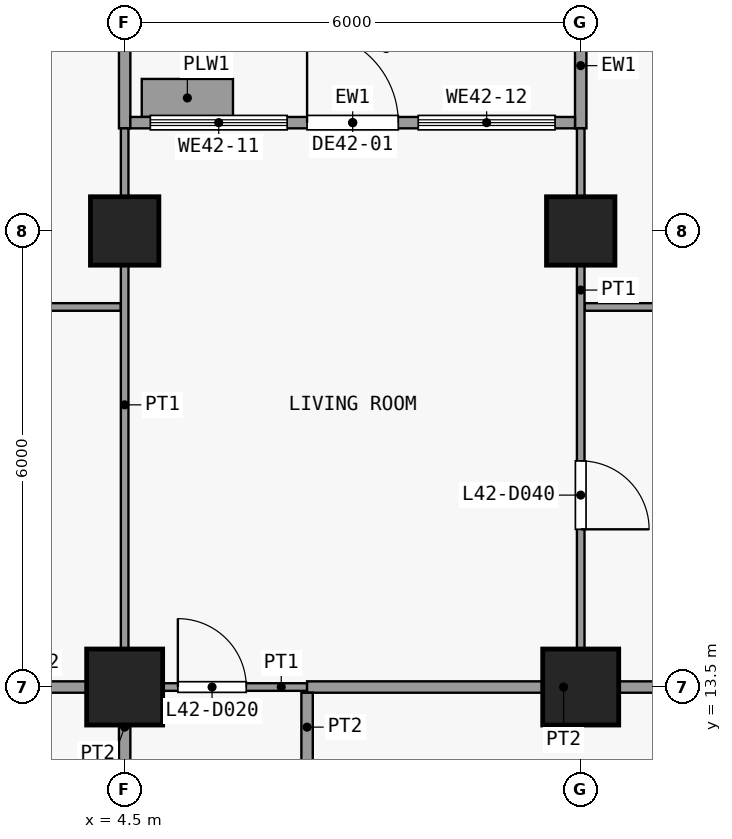
"""IFC4 building model, lengths in metres.
Left out: names, types, materials, properties, quantities, classifications, styles, units other than length and angle.
Written with IfcOpenShell. Run it as: python <this file> out.ifc"""

import sys

from ifc_helpers import new_model, si_unit, direction, frame, frame_2d, origin, origin_2d, place, context, subcontext, project, spatial, rectangle, extrude, element, fill, save


model = new_model("IFC4")
c1 = context("Model", 3, precision=1e-05, world=origin(), true_north=direction((0.0, 1.0)))
c2 = subcontext(c1, "Body", "Model", "MODEL_VIEW")
j1 = project(units=[si_unit("LENGTHUNIT", "METRE"), si_unit("PLANEANGLEUNIT", "RADIAN")], contexts=[c1])
p1 = place(None, origin())
s1 = spatial("IfcSite", under=j1, at=p1, CompositionType="ELEMENT")
p2 = place(p1, origin())
s2 = spatial("IfcBuilding", under=s1, at=p2, CompositionType="ELEMENT")
p3 = place(p2, frame((0.0, 0.0, 170.9)))
s3 = spatial("IfcBuildingStorey", under=s2, at=p3, CompositionType="ELEMENT", Elevation=170.9)
p4 = place(p3, frame((4.5, 13.5, 0.0), z_axis=(0.0, 0.0, 1.0), x_axis=(1.0, 0.0, 0.0)))
e1 = element("IfcColumn", 1, at=p4, inside=s3, PredefinedType="COLUMN", context=c2, shape_type="SweptSolid", body=[
    extrude(rectangle(XDim=1.0, YDim=1.0, at=origin_2d()), origin(), (0.0, 0.0, 1.0), 3.6),
])
p5 = place(p3, frame((4.5, 19.5, 0.0), z_axis=(0.0, 0.0, 1.0), x_axis=(1.0, 0.0, 0.0)))
e2 = element("IfcColumn", 2, at=p5, inside=s3, PredefinedType="COLUMN", context=c2, shape_type="SweptSolid", body=[
    extrude(rectangle(XDim=0.9, YDim=0.9, at=origin_2d()), origin(), (0.0, 0.0, 1.0), 3.6),
])
p6 = place(p3, frame((10.5, 13.5, 0.0), z_axis=(0.0, 0.0, 1.0), x_axis=(1.0, 0.0, 0.0)))
e3 = element("IfcColumn", 3, at=p6, inside=s3, PredefinedType="COLUMN", context=c2, shape_type="SweptSolid", body=[
    extrude(rectangle(XDim=1.0, YDim=1.0, at=origin_2d()), origin(), (0.0, 0.0, 1.0), 3.6),
])
p7 = place(p3, frame((10.5, 19.5, 0.0), z_axis=(0.0, 0.0, 1.0), x_axis=(1.0, 0.0, 0.0)))
e4 = element("IfcColumn", 4, at=p7, inside=s3, PredefinedType="COLUMN", context=c2, shape_type="SweptSolid", body=[
    extrude(rectangle(XDim=0.9, YDim=0.9, at=origin_2d()), origin(), (0.0, 0.0, 1.0), 3.6),
])
p8 = place(p3, frame((4.5, 20.85, 0.0), z_axis=(0.0, 0.0, 1.0), x_axis=(0.0, 1.0, 0.0)))
e5 = element("IfcWall", 5, at=p8, inside=s3, PredefinedType="SOLIDWALL", context=c2, shape_type="SweptSolid", body=[
    extrude(rectangle(XDim=2.55, YDim=0.15, at=frame_2d((1.275, 0.0))), origin(), (0.0, 0.0, 1.0), 3.3),
])
p9 = place(p3, frame((10.5, 20.85, 0.0), z_axis=(0.0, 0.0, 1.0), x_axis=(0.0, 1.0, 0.0)))
e6 = element("IfcWall", 6, at=p9, inside=s3, PredefinedType="SOLIDWALL", context=c2, shape_type="SweptSolid", body=[
    extrude(rectangle(XDim=1.65, YDim=0.15, at=frame_2d((0.825, 0.0))), origin(), (0.0, 0.0, 1.0), 3.3),
])
p10 = place(p3, frame((4.575, 20.925, 0.0), z_axis=(0.0, 0.0, 1.0), x_axis=(1.0, 0.0, 0.0)))
e7 = element("IfcWall", 7, at=p10, inside=s3, PredefinedType="SOLIDWALL", context=c2, shape_type="SweptSolid", body=[
    extrude(rectangle(XDim=5.85, YDim=0.15, at=frame_2d((2.925, 0.0))), origin(), (0.0, 0.0, 1.0), 3.3),
])
p11 = place(p10, frame((2.325, 0.0, 0.0)))
e8 = element("IfcOpeningElement", 8, at=p11, cuts=e7, PredefinedType="OPENING", context=c2, shape_type="SweptSolid", body=[
    extrude(rectangle(XDim=1.2, YDim=2.4, at=frame_2d((0.6, 1.2))), frame((0.0, 0.085, 0.0), z_axis=(0.0, -1.0, 0.0), x_axis=(1.0, 0.0, 0.0)), (0.0, 0.0, 1.0), 0.17),
])
p12 = place(p10, frame((0.262, 0.0, 0.9)))
e9 = element("IfcOpeningElement", 9, at=p12, cuts=e7, PredefinedType="OPENING", context=c2, shape_type="SweptSolid", body=[
    extrude(rectangle(XDim=1.8, YDim=2.1, at=frame_2d((0.9, 1.05))), frame((0.0, 0.085, 0.0), z_axis=(0.0, -1.0, 0.0), x_axis=(1.0, 0.0, 0.0)), (0.0, 0.0, 1.0), 0.17),
])
p13 = place(p10, frame((3.788, 0.0, 0.9)))
e10 = element("IfcOpeningElement", 10, at=p13, cuts=e7, PredefinedType="OPENING", context=c2, shape_type="SweptSolid", body=[
    extrude(rectangle(XDim=1.8, YDim=2.1, at=frame_2d((0.9, 1.05))), frame((0.0, 0.085, 0.0), z_axis=(0.0, -1.0, 0.0), x_axis=(1.0, 0.0, 0.0)), (0.0, 0.0, 1.0), 0.17),
])
p14 = place(p3, frame((4.725, 21.25, 0.0), z_axis=(0.0, 0.0, 1.0), x_axis=(1.0, 0.0, 0.0)))
e11 = element("IfcWall", 11, at=p14, inside=s3, PredefinedType="USERDEFINED", context=c2, shape_type="SweptSolid", body=[
    extrude(rectangle(XDim=1.2, YDim=0.5, at=frame_2d((0.6, 0.0))), origin(), (0.0, 0.0, 1.0), 0.9),
])
p15 = place(p3, frame((4.5, 13.5, 0.0), z_axis=(0.0, 0.0, 1.0), x_axis=(1.0, 0.0, 0.0)))
e12 = element("IfcWall", 12, at=p15, inside=s3, PredefinedType="PARTITIONING", context=c2, shape_type="SweptSolid", body=[
    extrude(rectangle(XDim=2.4, YDim=0.1, at=frame_2d((1.2, 0.0))), origin(), (0.0, 0.0, 1.0), 3.3),
])
p16 = place(p15, frame((0.7, 0.0, 0.0)))
e13 = element("IfcOpeningElement", 13, at=p16, cuts=e12, PredefinedType="OPENING", context=c2, shape_type="SweptSolid", body=[
    extrude(rectangle(XDim=0.9, YDim=2.1, at=frame_2d((0.45, 1.05))), frame((0.0, 0.06, 0.0), z_axis=(0.0, -1.0, 0.0), x_axis=(1.0, 0.0, 0.0)), (0.0, 0.0, 1.0), 0.12),
])
p17 = place(p3, frame((-1.0, 13.5, 0.0), z_axis=(0.0, 0.0, 1.0), x_axis=(1.0, 0.0, 0.0)))
e14 = element("IfcWall", 14, at=p17, inside=s3, PredefinedType="PARTITIONING", context=c2, shape_type="SweptSolid", body=[
    extrude(rectangle(XDim=5.5, YDim=0.15, at=frame_2d((2.75, 0.0))), origin(), (0.0, 0.0, 1.0), 3.3),
])
p18 = place(p17, frame((2.3, 0.0, 0.0)))
e15 = element("IfcOpeningElement", 15, at=p18, cuts=e14, PredefinedType="OPENING", context=c2, shape_type="SweptSolid", body=[
    extrude(rectangle(XDim=0.9, YDim=2.1, at=frame_2d((0.45, 1.05))), frame((0.0, 0.085, 0.0), z_axis=(0.0, -1.0, 0.0), x_axis=(1.0, 0.0, 0.0)), (0.0, 0.0, 1.0), 0.17),
])
p19 = place(p3, frame((6.9, 13.5, 0.0), z_axis=(0.0, 0.0, 1.0), x_axis=(1.0, 0.0, 0.0)))
e16 = element("IfcWall", 16, at=p19, inside=s3, PredefinedType="PARTITIONING", context=c2, shape_type="SweptSolid", body=[
    extrude(rectangle(XDim=6.75, YDim=0.15, at=frame_2d((3.375, 0.0))), origin(), (0.0, 0.0, 1.0), 3.3),
])
p20 = place(p3, frame((-4.4, 18.5, 0.0), z_axis=(0.0, 0.0, 1.0), x_axis=(1.0, 0.0, 0.0)))
e17 = element("IfcWall", 17, at=p20, inside=s3, PredefinedType="PARTITIONING", context=c2, shape_type="SweptSolid", body=[
    extrude(rectangle(XDim=8.85, YDim=0.1, at=frame_2d((4.425, 0.0))), origin(), (0.0, 0.0, 1.0), 3.3),
])
p21 = place(p20, frame((4.0, 0.0, 0.0)))
e18 = element("IfcOpeningElement", 18, at=p21, cuts=e17, PredefinedType="OPENING", context=c2, shape_type="SweptSolid", body=[
    extrude(rectangle(XDim=0.9, YDim=2.1, at=frame_2d((0.45, 1.05))), frame((0.0, 0.06, 0.0), z_axis=(0.0, -1.0, 0.0), x_axis=(1.0, 0.0, 0.0)), (0.0, 0.0, 1.0), 0.12),
])
p22 = place(p3, frame((10.55, 18.5, 0.0), z_axis=(0.0, 0.0, 1.0), x_axis=(1.0, 0.0, 0.0)))
e19 = element("IfcWall", 19, at=p22, inside=s3, PredefinedType="PARTITIONING", context=c2, shape_type="SweptSolid", body=[
    extrude(rectangle(XDim=4.8, YDim=0.1, at=frame_2d((2.4, 0.0))), origin(), (0.0, 0.0, 1.0), 3.3),
])
p23 = place(p22, frame((1.9, 0.0, 0.0)))
e20 = element("IfcOpeningElement", 20, at=p23, cuts=e19, PredefinedType="OPENING", context=c2, shape_type="SweptSolid", body=[
    extrude(rectangle(XDim=0.9, YDim=2.1, at=frame_2d((0.45, 1.05))), frame((0.0, 0.06, 0.0), z_axis=(0.0, -1.0, 0.0), x_axis=(1.0, 0.0, 0.0)), (0.0, 0.0, 1.0), 0.12),
])
p24 = place(p3, frame((4.5, 13.575, 0.0), z_axis=(0.0, 0.0, 1.0), x_axis=(0.0, 1.0, 0.0)))
e21 = element("IfcWall", 21, at=p24, inside=s3, PredefinedType="PARTITIONING", context=c2, shape_type="SweptSolid", body=[
    extrude(rectangle(XDim=7.275, YDim=0.1, at=frame_2d((3.638, 0.0))), origin(), (0.0, 0.0, 1.0), 3.3),
])
p25 = place(p3, frame((4.5, 10.6, 0.0), z_axis=(0.0, 0.0, 1.0), x_axis=(0.0, 1.0, 0.0)))
e22 = element("IfcWall", 22, at=p25, inside=s3, PredefinedType="PARTITIONING", context=c2, shape_type="SweptSolid", body=[
    extrude(rectangle(XDim=2.825, YDim=0.15, at=frame_2d((1.413, 0.0))), origin(), (0.0, 0.0, 1.0), 3.3),
])
p26 = place(p25, frame((0.9, 0.0, 0.0)))
e23 = element("IfcOpeningElement", 23, at=p26, cuts=e22, PredefinedType="OPENING", context=c2, shape_type="SweptSolid", body=[
    extrude(rectangle(XDim=0.9, YDim=2.1, at=frame_2d((0.45, 1.05))), frame((0.0, 0.085, 0.0), z_axis=(0.0, -1.0, 0.0), x_axis=(1.0, 0.0, 0.0)), (0.0, 0.0, 1.0), 0.17),
])
p27 = place(p3, frame((6.9, 10.6, 0.0), z_axis=(0.0, 0.0, 1.0), x_axis=(0.0, 1.0, 0.0)))
e24 = element("IfcWall", 24, at=p27, inside=s3, PredefinedType="PARTITIONING", context=c2, shape_type="SweptSolid", body=[
    extrude(rectangle(XDim=2.825, YDim=0.15, at=frame_2d((1.413, 0.0))), origin(), (0.0, 0.0, 1.0), 3.3),
])
p28 = place(p27, frame((0.9, 0.0, 0.0)))
e25 = element("IfcOpeningElement", 25, at=p28, cuts=e24, PredefinedType="OPENING", context=c2, shape_type="SweptSolid", body=[
    extrude(rectangle(XDim=0.9, YDim=2.1, at=frame_2d((0.45, 1.05))), frame((0.0, 0.085, 0.0), z_axis=(0.0, -1.0, 0.0), x_axis=(1.0, 0.0, 0.0)), (0.0, 0.0, 1.0), 0.17),
])
p29 = place(p3, frame((10.5, 13.575, 0.0), z_axis=(0.0, 0.0, 1.0), x_axis=(0.0, 1.0, 0.0)))
e26 = element("IfcWall", 26, at=p29, inside=s3, PredefinedType="PARTITIONING", context=c2, shape_type="SweptSolid", body=[
    extrude(rectangle(XDim=7.275, YDim=0.1, at=frame_2d((3.638, 0.0))), origin(), (0.0, 0.0, 1.0), 3.3),
])
p30 = place(p29, frame((2.0, 0.0, 0.0)))
e27 = element("IfcOpeningElement", 27, at=p30, cuts=e26, PredefinedType="OPENING", context=c2, shape_type="SweptSolid", body=[
    extrude(rectangle(XDim=0.9, YDim=2.1, at=frame_2d((0.45, 1.05))), frame((0.0, 0.06, 0.0), z_axis=(0.0, -1.0, 0.0), x_axis=(1.0, 0.0, 0.0)), (0.0, 0.0, 1.0), 0.12),
])
p31 = place(p11, origin())
e28 = element("IfcDoor", 28, at=p31, inside=s3, OperationType="SINGLE_SWING_LEFT", PredefinedType="DOOR", context=c2, shape_type="SweptSolid", body=[
    extrude(rectangle(XDim=1.2, YDim=2.4, at=frame_2d((0.6, 1.2))), frame((0.0, 0.025, 0.0), z_axis=(0.0, -1.0, 0.0), x_axis=(1.0, 0.0, 0.0)), (0.0, 0.0, 1.0), 0.05),
])
fill(e8, e28)
p32 = place(p12, origin())
e29 = element("IfcWindow", 29, at=p32, inside=s3, PartitioningType="SINGLE_PANEL", PredefinedType="WINDOW", context=c2, shape_type="SweptSolid", body=[
    extrude(rectangle(XDim=1.8, YDim=2.1, at=frame_2d((0.9, 1.05))), frame((0.0, 0.03, 0.0), z_axis=(0.0, -1.0, 0.0), x_axis=(1.0, 0.0, 0.0)), (0.0, 0.0, 1.0), 0.06),
])
fill(e9, e29)
p33 = place(p13, origin())
e30 = element("IfcWindow", 30, at=p33, inside=s3, PartitioningType="SINGLE_PANEL", PredefinedType="WINDOW", context=c2, shape_type="SweptSolid", body=[
    extrude(rectangle(XDim=1.8, YDim=2.1, at=frame_2d((0.9, 1.05))), frame((0.0, 0.03, 0.0), z_axis=(0.0, -1.0, 0.0), x_axis=(1.0, 0.0, 0.0)), (0.0, 0.0, 1.0), 0.06),
])
fill(e10, e30)
p34 = place(p16, origin())
e31 = element("IfcDoor", 31, at=p34, inside=s3, OperationType="SINGLE_SWING_RIGHT", PredefinedType="DOOR", context=c2, shape_type="SweptSolid", body=[
    extrude(rectangle(XDim=0.9, YDim=2.1, at=frame_2d((0.45, 1.05))), frame((0.0, 0.025, 0.0), z_axis=(0.0, -1.0, 0.0), x_axis=(1.0, 0.0, 0.0)), (0.0, 0.0, 1.0), 0.05),
])
fill(e13, e31)
p35 = place(p30, origin())
e32 = element("IfcDoor", 32, at=p35, inside=s3, OperationType="SINGLE_SWING_LEFT", PredefinedType="DOOR", context=c2, shape_type="SweptSolid", body=[
    extrude(rectangle(XDim=0.9, YDim=2.1, at=frame_2d((0.45, 1.05))), frame((0.0, 0.025, 0.0), z_axis=(0.0, -1.0, 0.0), x_axis=(1.0, 0.0, 0.0)), (0.0, 0.0, 1.0), 0.05),
])
fill(e27, e32)
save(model, sys.argv[1])
